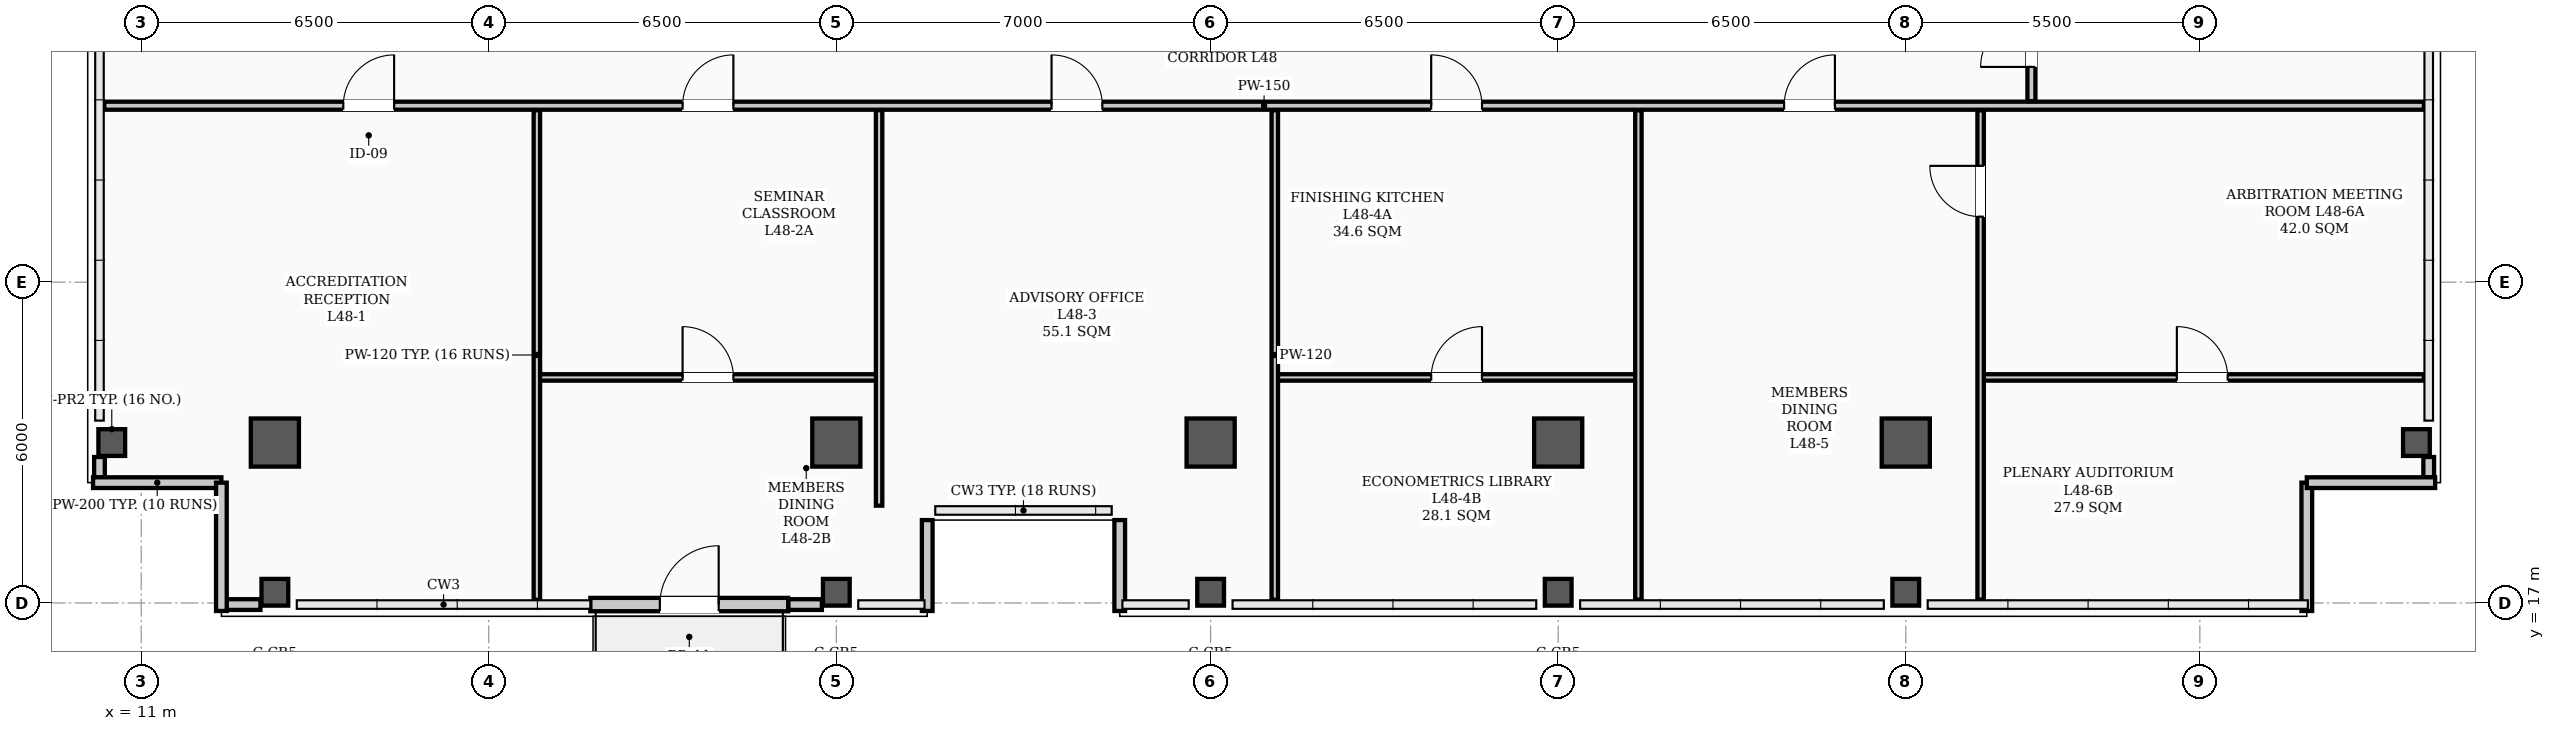
"""IFC4 building model, lengths in metres.
Left out: names, types, materials, properties, quantities, classifications, styles, units other than length and angle.
Written with IfcOpenShell. Run it as: python <this file> out.ifc"""

import sys

from ifc_helpers import new_model, si_unit, direction, frame, frame_2d, origin, origin_2d, place, context, subcontext, project, spatial, rectangle, hollow_rectangle, extrude, element, fill, save


model = new_model("IFC4")
c1 = context("Model", 3, precision=1e-05, world=origin(), true_north=direction((0.0, 1.0)))
c2 = subcontext(c1, "Body", "Model", "MODEL_VIEW")
j1 = project(units=[si_unit("LENGTHUNIT", "METRE"), si_unit("PLANEANGLEUNIT", "RADIAN")], contexts=[c1])
p1 = place(None, origin())
s1 = spatial("IfcSite", under=j1, at=p1, CompositionType="ELEMENT")
p2 = place(p1, origin())
s2 = spatial("IfcBuilding", under=s1, at=p2, CompositionType="ELEMENT")
p3 = place(p2, frame((0.0, 0.0, 192.9)))
s3 = spatial("IfcBuildingStorey", under=s2, at=p3, CompositionType="ELEMENT", Elevation=192.9)
for number, where, z_axis, x_axis in (
    (1, (13.5, 20.0, 0.0), (0.0, 0.0, 1.0), (1.0, 0.0, 0.0)),
    (2, (24.0, 20.0, 0.0), (0.0, 0.0, 1.0), (1.0, 0.0, 0.0)),
    (3, (31.0, 20.0, 0.0), (0.0, 0.0, 1.0), (1.0, 0.0, 0.0)),
    (4, (37.5, 20.0, 0.0), (0.0, 0.0, 1.0), (1.0, 0.0, 0.0)),
    (5, (44.0, 20.0, 0.0), (0.0, 0.0, 1.0), (1.0, 0.0, 0.0)),
):
    element("IfcColumn", number, at=place(p3, frame(where, z_axis=z_axis, x_axis=x_axis)), inside=s3, PredefinedType="COLUMN", context=c2, shape_type="SweptSolid", body=[
        extrude(hollow_rectangle(XDim=0.9, YDim=0.9, WallThickness=0.035, InnerFilletRadius=0.017, OuterFilletRadius=0.052, at=origin_2d()), origin(), (0.0, 0.0, 1.0), 3.9),
    ])
for number, where, z_axis, x_axis in (
    (6, (10.45, 20.0, 0.0), (0.0, 0.0, 1.0), (1.0, 0.0, 0.0)),
    (7, (13.5, 17.2, 0.0), (0.0, 0.0, 1.0), (1.0, 0.0, 0.0)),
    (8, (24.0, 17.2, 0.0), (0.0, 0.0, 1.0), (1.0, 0.0, 0.0)),
    (9, (31.0, 17.2, 0.0), (0.0, 0.0, 1.0), (1.0, 0.0, 0.0)),
    (10, (37.5, 17.2, 0.0), (0.0, 0.0, 1.0), (1.0, 0.0, 0.0)),
    (11, (44.0, 17.2, 0.0), (0.0, 0.0, 1.0), (1.0, 0.0, 0.0)),
    (12, (53.55, 20.0, 0.0), (0.0, 0.0, 1.0), (1.0, 0.0, 0.0)),
):
    element("IfcColumn", number, at=place(p3, frame(where, z_axis=z_axis, x_axis=x_axis)), inside=s3, PredefinedType="COLUMN", context=c2, shape_type="SweptSolid", body=[
        extrude(hollow_rectangle(XDim=0.5, YDim=0.5, WallThickness=0.024, InnerFilletRadius=0.012, OuterFilletRadius=0.036, at=origin_2d()), origin(), (0.0, 0.0, 1.0), 3.9),
    ])
for number, where, z_axis, x_axis in (
    (13, (10.22, 19.35, 0.0), (0.0, 0.0, 1.0), (0.0, 1.0, 0.0)),
    (14, (53.78, 19.35, 0.0), (0.0, 0.0, 1.0), (0.0, 1.0, 0.0)),
):
    element("IfcWall", number, at=place(p3, frame(where, z_axis=z_axis, x_axis=x_axis)), inside=s3, PredefinedType="PARAPET", context=c2, shape_type="SweptSolid", body=[
        extrude(rectangle(XDim=0.38, YDim=0.2, at=frame_2d((0.19, 0.0))), origin(), (0.0, 0.0, 1.0), 1.2),
    ])
for number, where, z_axis, x_axis in (
    (15, (12.6, 16.97, 0.0), (0.0, 0.0, 1.0), (1.0, 0.0, 0.0)),
    (16, (23.1, 16.97, 0.0), (0.0, 0.0, 1.0), (1.0, 0.0, 0.0)),
):
    element("IfcWall", number, at=place(p3, frame(where, z_axis=z_axis, x_axis=x_axis)), inside=s3, PredefinedType="PARAPET", context=c2, shape_type="SweptSolid", body=[
        extrude(rectangle(XDim=0.63, YDim=0.2, at=frame_2d((0.315, 0.0))), origin(), (0.0, 0.0, 1.0), 1.2),
    ])
for number, where, z_axis, x_axis in (
    (17, (10.1, 19.25, 0.0), (0.0, 0.0, 1.0), (1.0, 0.0, 0.0)),
    (18, (12.5, 19.25, 0.0), (0.0, 0.0, 1.0), (0.0, -1.0, 0.0)),
    (19, (51.5, 16.85, 0.0), (0.0, 0.0, 1.0), (0.0, 1.0, 0.0)),
    (20, (51.5, 19.25, 0.0), (0.0, 0.0, 1.0), (1.0, 0.0, 0.0)),
):
    element("IfcWall", number, at=place(p3, frame(where, z_axis=z_axis, x_axis=x_axis)), inside=s3, PredefinedType="PARAPET", context=c2, shape_type="SweptSolid", body=[
        extrude(rectangle(XDim=2.4, YDim=0.2, at=frame_2d((1.2, 0.0))), origin(), (0.0, 0.0, 1.0), 1.2),
    ])
for number, where, z_axis, x_axis in (
    (21, (25.7, 16.85, 0.0), (0.0, 0.0, 1.0), (0.0, 1.0, 0.0)),
    (22, (29.3, 18.55, 0.0), (0.0, 0.0, 1.0), (0.0, -1.0, 0.0)),
):
    element("IfcWall", number, at=place(p3, frame(where, z_axis=z_axis, x_axis=x_axis)), inside=s3, PredefinedType="PARAPET", context=c2, shape_type="SweptSolid", body=[
        extrude(rectangle(XDim=1.7, YDim=0.2, at=frame_2d((0.85, 0.0))), origin(), (0.0, 0.0, 1.0), 1.2),
    ])
p4 = place(p3, frame((19.4, 16.97, 0.0), z_axis=(0.0, 0.0, 1.0), x_axis=(1.0, 0.0, 0.0)))
e23 = element("IfcWall", 23, at=p4, inside=s3, PredefinedType="STANDARD", context=c2, shape_type="SweptSolid", body=[
    extrude(rectangle(XDim=3.7, YDim=0.25, at=frame_2d((1.85, 0.0))), origin(), (0.0, 0.0, 1.0), 2.22),
])
p5 = place(p4, frame((1.3, 0.0, 0.0)))
e24 = element("IfcOpeningElement", 24, at=p5, cuts=e23, PredefinedType="OPENING", context=c2, shape_type="SweptSolid", body=[
    extrude(rectangle(XDim=1.1, YDim=2.2, at=frame_2d((0.55, 1.1))), frame((0.0, 0.135, 0.0), z_axis=(0.0, -1.0, 0.0), x_axis=(1.0, 0.0, 0.0)), (0.0, 0.0, 1.0), 0.27),
])
p6 = place(p3, frame((10.31, 26.3, 0.0), z_axis=(0.0, 0.0, 1.0), x_axis=(1.0, 0.0, 0.0)))
e25 = element("IfcWall", 25, at=p6, inside=s3, PredefinedType="PARTITIONING", context=c2, shape_type="SweptSolid", body=[
    extrude(rectangle(XDim=43.38, YDim=0.15, at=frame_2d((21.69, 0.0))), origin(), (0.0, 0.0, 1.0), 2.24),
])
p7 = place(p6, frame((4.47, 0.0, 0.0)))
e26 = element("IfcOpeningElement", 26, at=p7, cuts=e25, PredefinedType="OPENING", context=c2, shape_type="SweptSolid", body=[
    extrude(rectangle(XDim=0.95, YDim=2.08, at=frame_2d((0.475, 1.04))), frame((0.0, 0.085, 0.0), z_axis=(0.0, -1.0, 0.0), x_axis=(1.0, 0.0, 0.0)), (0.0, 0.0, 1.0), 0.17),
])
p8 = place(p6, frame((10.815, 0.0, 0.0)))
e27 = element("IfcOpeningElement", 27, at=p8, cuts=e25, PredefinedType="OPENING", context=c2, shape_type="SweptSolid", body=[
    extrude(rectangle(XDim=0.95, YDim=2.08, at=frame_2d((0.475, 1.04))), frame((0.0, 0.085, 0.0), z_axis=(0.0, -1.0, 0.0), x_axis=(1.0, 0.0, 0.0)), (0.0, 0.0, 1.0), 0.17),
])
p9 = place(p6, frame((17.715, 0.0, 0.0)))
e28 = element("IfcOpeningElement", 28, at=p9, cuts=e25, PredefinedType="OPENING", context=c2, shape_type="SweptSolid", body=[
    extrude(rectangle(XDim=0.95, YDim=2.08, at=frame_2d((0.475, 1.04))), frame((0.0, 0.085, 0.0), z_axis=(0.0, -1.0, 0.0), x_axis=(1.0, 0.0, 0.0)), (0.0, 0.0, 1.0), 0.17),
])
p10 = place(p6, frame((24.815, 0.0, 0.0)))
e29 = element("IfcOpeningElement", 29, at=p10, cuts=e25, PredefinedType="OPENING", context=c2, shape_type="SweptSolid", body=[
    extrude(rectangle(XDim=0.95, YDim=2.08, at=frame_2d((0.475, 1.04))), frame((0.0, 0.085, 0.0), z_axis=(0.0, -1.0, 0.0), x_axis=(1.0, 0.0, 0.0)), (0.0, 0.0, 1.0), 0.17),
])
p11 = place(p6, frame((31.415, 0.0, 0.0)))
e30 = element("IfcOpeningElement", 30, at=p11, cuts=e25, PredefinedType="OPENING", context=c2, shape_type="SweptSolid", body=[
    extrude(rectangle(XDim=0.95, YDim=2.08, at=frame_2d((0.475, 1.04))), frame((0.0, 0.085, 0.0), z_axis=(0.0, -1.0, 0.0), x_axis=(1.0, 0.0, 0.0)), (0.0, 0.0, 1.0), 0.17),
])
p12 = place(p3, frame((18.4, 21.218, 0.0), z_axis=(0.0, 0.0, 1.0), x_axis=(1.0, 0.0, 0.0)))
e31 = element("IfcWall", 31, at=p12, inside=s3, PredefinedType="PARTITIONING", context=c2, shape_type="SweptSolid", body=[
    extrude(rectangle(XDim=6.4, YDim=0.12, at=frame_2d((3.2, 0.0))), origin(), (0.0, 0.0, 1.0), 2.24),
])
p13 = place(p12, frame((2.725, 0.0, 0.0)))
e32 = element("IfcOpeningElement", 32, at=p13, cuts=e31, PredefinedType="OPENING", context=c2, shape_type="SweptSolid", body=[
    extrude(rectangle(XDim=0.95, YDim=2.08, at=frame_2d((0.475, 1.04))), frame((0.0, 0.07, 0.0), z_axis=(0.0, -1.0, 0.0), x_axis=(1.0, 0.0, 0.0)), (0.0, 0.0, 1.0), 0.14),
])
p14 = place(p3, frame((32.2, 21.218, 0.0), z_axis=(0.0, 0.0, 1.0), x_axis=(1.0, 0.0, 0.0)))
e33 = element("IfcWall", 33, at=p14, inside=s3, PredefinedType="PARTITIONING", context=c2, shape_type="SweptSolid", body=[
    extrude(rectangle(XDim=6.8, YDim=0.12, at=frame_2d((3.4, 0.0))), origin(), (0.0, 0.0, 1.0), 2.24),
])
p15 = place(p14, frame((2.925, 0.0, 0.0)))
e34 = element("IfcOpeningElement", 34, at=p15, cuts=e33, PredefinedType="OPENING", context=c2, shape_type="SweptSolid", body=[
    extrude(rectangle(XDim=0.95, YDim=2.08, at=frame_2d((0.475, 1.04))), frame((0.0, 0.07, 0.0), z_axis=(0.0, -1.0, 0.0), x_axis=(1.0, 0.0, 0.0)), (0.0, 0.0, 1.0), 0.14),
])
p16 = place(p3, frame((45.4, 21.218, 0.0), z_axis=(0.0, 0.0, 1.0), x_axis=(1.0, 0.0, 0.0)))
e35 = element("IfcWall", 35, at=p16, inside=s3, PredefinedType="PARTITIONING", context=c2, shape_type="SweptSolid", body=[
    extrude(rectangle(XDim=8.29, YDim=0.12, at=frame_2d((4.145, 0.0))), origin(), (0.0, 0.0, 1.0), 2.24),
])
p17 = place(p16, frame((3.67, 0.0, 0.0)))
e36 = element("IfcOpeningElement", 36, at=p17, cuts=e35, PredefinedType="OPENING", context=c2, shape_type="SweptSolid", body=[
    extrude(rectangle(XDim=0.95, YDim=2.08, at=frame_2d((0.475, 1.04))), frame((0.0, 0.07, 0.0), z_axis=(0.0, -1.0, 0.0), x_axis=(1.0, 0.0, 0.0)), (0.0, 0.0, 1.0), 0.14),
])
p18 = place(p3, frame((46.35, 26.385, 0.0), z_axis=(0.0, 0.0, 1.0), x_axis=(0.0, 1.0, 0.0)))
e37 = element("IfcWall", 37, at=p18, inside=s3, PredefinedType="PARTITIONING", context=c2, shape_type="SweptSolid", body=[
    extrude(rectangle(XDim=13.58, YDim=0.15, at=frame_2d((6.79, 0.0))), origin(), (0.0, 0.0, 1.0), 2.24),
])
p19 = place(p18, frame((0.64, 0.0, 0.0)))
e38 = element("IfcOpeningElement", 38, at=p19, cuts=e37, PredefinedType="OPENING", context=c2, shape_type="SweptSolid", body=[
    extrude(rectangle(XDim=0.95, YDim=2.08, at=frame_2d((0.475, 1.04))), frame((0.0, 0.085, 0.0), z_axis=(0.0, -1.0, 0.0), x_axis=(1.0, 0.0, 0.0)), (0.0, 0.0, 1.0), 0.17),
])
p20 = place(p18, frame((7.04, 0.0, 0.0)))
e39 = element("IfcOpeningElement", 39, at=p20, cuts=e37, PredefinedType="OPENING", context=c2, shape_type="SweptSolid", body=[
    extrude(rectangle(XDim=0.95, YDim=2.08, at=frame_2d((0.475, 1.04))), frame((0.0, 0.085, 0.0), z_axis=(0.0, -1.0, 0.0), x_axis=(1.0, 0.0, 0.0)), (0.0, 0.0, 1.0), 0.17),
])
p21 = place(p18, frame((11.065, 0.0, 0.0)))
e40 = element("IfcOpeningElement", 40, at=p21, cuts=e37, PredefinedType="OPENING", context=c2, shape_type="SweptSolid", body=[
    extrude(rectangle(XDim=0.95, YDim=2.08, at=frame_2d((0.475, 1.04))), frame((0.0, 0.085, 0.0), z_axis=(0.0, -1.0, 0.0), x_axis=(1.0, 0.0, 0.0)), (0.0, 0.0, 1.0), 0.17),
])
p22 = place(p3, frame((18.4, 17.06, 0.0), z_axis=(0.0, 0.0, 1.0), x_axis=(0.0, 1.0, 0.0)))
e41 = element("IfcWall", 41, at=p22, inside=s3, PredefinedType="PARTITIONING", context=c2, shape_type="SweptSolid", body=[
    extrude(rectangle(XDim=9.155, YDim=0.12, at=frame_2d((4.578, 0.0))), origin(), (0.0, 0.0, 1.0), 2.24),
])
p23 = place(p3, frame((24.8, 18.82, 0.0), z_axis=(0.0, 0.0, 1.0), x_axis=(0.0, 1.0, 0.0)))
e42 = element("IfcWall", 42, at=p23, inside=s3, PredefinedType="PARTITIONING", context=c2, shape_type="SweptSolid", body=[
    extrude(rectangle(XDim=7.395, YDim=0.12, at=frame_2d((3.698, 0.0))), origin(), (0.0, 0.0, 1.0), 2.24),
])
for number, where, z_axis, x_axis in (
    (43, (32.2, 17.06, 0.0), (0.0, 0.0, 1.0), (0.0, 1.0, 0.0)),
    (44, (39.0, 17.06, 0.0), (0.0, 0.0, 1.0), (0.0, 1.0, 0.0)),
):
    element("IfcWall", number, at=place(p3, frame(where, z_axis=z_axis, x_axis=x_axis)), inside=s3, PredefinedType="PARTITIONING", context=c2, shape_type="SweptSolid", body=[
        extrude(rectangle(XDim=9.155, YDim=0.12, at=frame_2d((4.578, 0.0))), origin(), (0.0, 0.0, 1.0), 2.24),
    ])
p24 = place(p3, frame((45.4, 17.06, 0.0), z_axis=(0.0, 0.0, 1.0), x_axis=(0.0, 1.0, 0.0)))
e45 = element("IfcWall", 45, at=p24, inside=s3, PredefinedType="PARTITIONING", context=c2, shape_type="SweptSolid", body=[
    extrude(rectangle(XDim=9.155, YDim=0.12, at=frame_2d((4.578, 0.0))), origin(), (0.0, 0.0, 1.0), 2.24),
])
p25 = place(p24, frame((7.165, 0.0, 0.0)))
e46 = element("IfcOpeningElement", 46, at=p25, cuts=e45, PredefinedType="OPENING", context=c2, shape_type="SweptSolid", body=[
    extrude(rectangle(XDim=0.95, YDim=2.08, at=frame_2d((0.475, 1.04))), frame((0.0, 0.07, 0.0), z_axis=(0.0, -1.0, 0.0), x_axis=(1.0, 0.0, 0.0)), (0.0, 0.0, 1.0), 0.14),
])
p26 = place(p5, origin())
e47 = element("IfcDoor", 47, at=p26, inside=s3, OperationType="SINGLE_SWING_RIGHT", PredefinedType="DOOR", context=c2, shape_type="SweptSolid", body=[
    extrude(rectangle(XDim=1.1, YDim=2.2, at=frame_2d((0.55, 1.1))), frame((0.0, 0.025, 0.0), z_axis=(0.0, -1.0, 0.0), x_axis=(1.0, 0.0, 0.0)), (0.0, 0.0, 1.0), 0.05),
])
fill(e24, e47)
p27 = place(p7, origin())
e48 = element("IfcDoor", 48, at=p27, inside=s3, OperationType="SINGLE_SWING_RIGHT", PredefinedType="DOOR", context=c2, shape_type="SweptSolid", body=[
    extrude(rectangle(XDim=0.95, YDim=2.08, at=frame_2d((0.475, 1.04))), frame((0.0, 0.025, 0.0), z_axis=(0.0, -1.0, 0.0), x_axis=(1.0, 0.0, 0.0)), (0.0, 0.0, 1.0), 0.05),
])
fill(e26, e48)
p28 = place(p13, origin())
e49 = element("IfcDoor", 49, at=p28, inside=s3, OperationType="SINGLE_SWING_LEFT", PredefinedType="DOOR", context=c2, shape_type="SweptSolid", body=[
    extrude(rectangle(XDim=0.95, YDim=2.08, at=frame_2d((0.475, 1.04))), frame((0.0, 0.025, 0.0), z_axis=(0.0, -1.0, 0.0), x_axis=(1.0, 0.0, 0.0)), (0.0, 0.0, 1.0), 0.05),
])
fill(e32, e49)
p29 = place(p8, origin())
e50 = element("IfcDoor", 50, at=p29, inside=s3, OperationType="SINGLE_SWING_RIGHT", PredefinedType="DOOR", context=c2, shape_type="SweptSolid", body=[
    extrude(rectangle(XDim=0.95, YDim=2.08, at=frame_2d((0.475, 1.04))), frame((0.0, 0.025, 0.0), z_axis=(0.0, -1.0, 0.0), x_axis=(1.0, 0.0, 0.0)), (0.0, 0.0, 1.0), 0.05),
])
fill(e27, e50)
p30 = place(p9, origin())
e51 = element("IfcDoor", 51, at=p30, inside=s3, OperationType="SINGLE_SWING_LEFT", PredefinedType="DOOR", context=c2, shape_type="SweptSolid", body=[
    extrude(rectangle(XDim=0.95, YDim=2.08, at=frame_2d((0.475, 1.04))), frame((0.0, 0.025, 0.0), z_axis=(0.0, -1.0, 0.0), x_axis=(1.0, 0.0, 0.0)), (0.0, 0.0, 1.0), 0.05),
])
fill(e28, e51)
p31 = place(p15, origin())
e52 = element("IfcDoor", 52, at=p31, inside=s3, OperationType="SINGLE_SWING_RIGHT", PredefinedType="DOOR", context=c2, shape_type="SweptSolid", body=[
    extrude(rectangle(XDim=0.95, YDim=2.08, at=frame_2d((0.475, 1.04))), frame((0.0, 0.025, 0.0), z_axis=(0.0, -1.0, 0.0), x_axis=(1.0, 0.0, 0.0)), (0.0, 0.0, 1.0), 0.05),
])
fill(e34, e52)
p32 = place(p10, origin())
e53 = element("IfcDoor", 53, at=p32, inside=s3, OperationType="SINGLE_SWING_LEFT", PredefinedType="DOOR", context=c2, shape_type="SweptSolid", body=[
    extrude(rectangle(XDim=0.95, YDim=2.08, at=frame_2d((0.475, 1.04))), frame((0.0, 0.025, 0.0), z_axis=(0.0, -1.0, 0.0), x_axis=(1.0, 0.0, 0.0)), (0.0, 0.0, 1.0), 0.05),
])
fill(e29, e53)
p33 = place(p11, origin())
e54 = element("IfcDoor", 54, at=p33, inside=s3, OperationType="SINGLE_SWING_RIGHT", PredefinedType="DOOR", context=c2, shape_type="SweptSolid", body=[
    extrude(rectangle(XDim=0.95, YDim=2.08, at=frame_2d((0.475, 1.04))), frame((0.0, 0.025, 0.0), z_axis=(0.0, -1.0, 0.0), x_axis=(1.0, 0.0, 0.0)), (0.0, 0.0, 1.0), 0.05),
])
fill(e30, e54)
p34 = place(p17, origin())
e55 = element("IfcDoor", 55, at=p34, inside=s3, OperationType="SINGLE_SWING_LEFT", PredefinedType="DOOR", context=c2, shape_type="SweptSolid", body=[
    extrude(rectangle(XDim=0.95, YDim=2.08, at=frame_2d((0.475, 1.04))), frame((0.0, 0.025, 0.0), z_axis=(0.0, -1.0, 0.0), x_axis=(1.0, 0.0, 0.0)), (0.0, 0.0, 1.0), 0.05),
])
fill(e36, e55)
p35 = place(p25, origin())
e56 = element("IfcDoor", 56, at=p35, inside=s3, OperationType="SINGLE_SWING_RIGHT", PredefinedType="DOOR", context=c2, shape_type="SweptSolid", body=[
    extrude(rectangle(XDim=0.95, YDim=2.08, at=frame_2d((0.475, 1.04))), frame((0.0, 0.025, 0.0), z_axis=(0.0, -1.0, 0.0), x_axis=(1.0, 0.0, 0.0)), (0.0, 0.0, 1.0), 0.05),
])
fill(e46, e56)
p36 = place(p19, origin())
e57 = element("IfcDoor", 57, at=p36, inside=s3, OperationType="SINGLE_SWING_LEFT", PredefinedType="DOOR", context=c2, shape_type="SweptSolid", body=[
    extrude(rectangle(XDim=0.95, YDim=2.08, at=frame_2d((0.475, 1.04))), frame((0.0, 0.025, 0.0), z_axis=(0.0, -1.0, 0.0), x_axis=(1.0, 0.0, 0.0)), (0.0, 0.0, 1.0), 0.05),
])
fill(e38, e57)
save(model, sys.argv[1])
